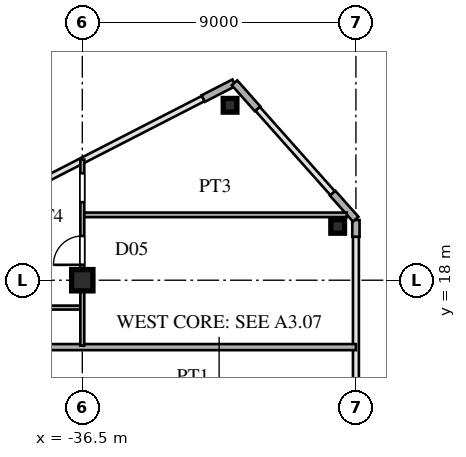
"""IFC4 building model, lengths in metres.
Left out: names, types, materials, properties, quantities, classifications, styles, units other than length and angle.
Written with IfcOpenShell. Run it as: python <this file> out.ifc"""

import sys

from ifc_helpers import new_model, si_unit, direction, frame, frame_2d, origin, origin_2d, place, context, subcontext, project, spatial, rectangle, hollow_rectangle, i_section, extrude, source, transform, mapped, element, fill, save


model = new_model("IFC4")
c1 = context("Model", 3, precision=1e-05, world=origin(), true_north=direction((0.0, 1.0)))
c2 = subcontext(c1, "Body", "Model", "MODEL_VIEW")
j1 = project(units=[si_unit("LENGTHUNIT", "METRE"), si_unit("PLANEANGLEUNIT", "RADIAN")], contexts=[c1])
p1 = place(None, origin())
s1 = spatial("IfcSite", under=j1, at=p1, CompositionType="ELEMENT")
p2 = place(p1, origin())
s2 = spatial("IfcBuilding", under=s1, at=p2, CompositionType="ELEMENT")
p3 = place(p2, frame((0.0, 0.0, 140.4)))
s3 = spatial("IfcBuildingStorey", under=s2, at=p3, CompositionType="ELEMENT", Elevation=140.4)
m1 = source(origin(), c2, "Body", "SweptSolid", [
    extrude(i_section(OverallWidth=0.7, OverallDepth=0.7, WebThickness=0.028, FlangeThickness=0.045, at=origin_2d()), origin(), (0.0, 0.0, 1.0), 3.6),
])
p4 = place(p3, frame((-36.5, 18.0, 0.0), z_axis=(0.0, 0.0, 1.0), x_axis=(1.0, 0.0, 0.0)))
e1 = element("IfcColumn", 1, at=p4, inside=s3, PredefinedType="COLUMN", context=c2, shape_type="MappedRepresentation", body=[
    mapped(m1, transform((0.0, 0.0, 0.0), scale=1.0)),
])
m2 = source(origin(), c2, "Body", "SweptSolid", [
    extrude(hollow_rectangle(XDim=0.45, YDim=0.45, WallThickness=0.018, at=origin_2d()), origin(), (0.0, 0.0, 1.0), 3.6),
])
for number, where, z_axis, x_axis in (
    (2, (-28.1, 19.772, 0.0), (0.0, 0.0, 1.0), (1.0, 0.0, 0.0)),
    (3, (-31.64, 23.754, 0.0), (0.0, 0.0, 1.0), (1.0, 0.0, 0.0)),
):
    element("IfcColumn", number, at=place(p3, frame(where, z_axis=z_axis, x_axis=x_axis)), inside=s3, PredefinedType="COLUMN", context=c2, shape_type="MappedRepresentation", body=[
        mapped(m2, transform((0.0, 0.0, 0.0), scale=1.0)),
    ])
p5 = place(p3, frame((-27.5, 19.43, 0.0), z_axis=(0.0, 0.0, 1.0), x_axis=(0.0, 1.0, 0.0)))
e4 = element("IfcWall", 4, at=p5, inside=s3, PredefinedType="SOLIDWALL", context=c2, shape_type="SweptSolid", body=[
    extrude(rectangle(XDim=0.55, YDim=0.24, at=frame_2d((0.275, 0.0))), origin(), (0.0, 0.0, 1.0), 3.38),
])
for number, where, z_axis, x_axis in (
    (5, (-27.507, 20.008, 0.0), (0.0, 0.0, 1.0), (-0.664, 0.747, 0.0)),
    (6, (-30.736, 23.64, 0.0), (0.0, 0.0, 1.0), (-0.664, 0.747, 0.0)),
):
    element("IfcWall", number, at=place(p3, frame(where, z_axis=z_axis, x_axis=x_axis)), inside=s3, PredefinedType="SOLIDWALL", context=c2, shape_type="SweptSolid", body=[
        extrude(rectangle(XDim=1.14, YDim=0.24, at=frame_2d((0.57, 0.0))), origin(), (0.0, 0.0, 1.0), 3.38),
    ])
p6 = place(p3, frame((-31.509, 24.495, 0.0), z_axis=(0.0, 0.0, 1.0), x_axis=(-0.889797395748, -0.456355776255, 0.0)))
e7 = element("IfcWall", 7, at=p6, inside=s3, PredefinedType="SOLIDWALL", context=c2, shape_type="SweptSolid", body=[
    extrude(rectangle(XDim=1.14, YDim=0.24, at=frame_2d((0.57, 0.0))), origin(), (0.0, 0.0, 1.0), 3.38),
])
p7 = place(p3, frame((-38.215, 15.8, 0.0), z_axis=(0.0, 0.0, 1.0), x_axis=(1.0, 0.0, 0.0)))
e8 = element("IfcWall", 8, at=p7, inside=s3, PredefinedType="PARTITIONING", context=c2, shape_type="SweptSolid", body=[
    extrude(rectangle(XDim=10.715, YDim=0.2, at=frame_2d((5.357, 0.0))), origin(), (0.0, 0.0, 1.0), 3.38),
])
p8 = place(p3, frame((-41.0, 17.1, 0.0), z_axis=(0.0, 0.0, 1.0), x_axis=(1.0, 0.0, 0.0)))
e9 = element("IfcWall", 9, at=p8, inside=s3, PredefinedType="PARTITIONING", context=c2, shape_type="SweptSolid", body=[
    extrude(rectangle(XDim=4.45, YDim=0.13, at=frame_2d((2.225, 0.0))), origin(), (0.0, 0.0, 1.0), 3.38),
])
p9 = place(p3, frame((-36.45, 20.15, 0.0), z_axis=(0.0, 0.0, 1.0), x_axis=(1.0, 0.0, 0.0)))
e10 = element("IfcWall", 10, at=p9, inside=s3, PredefinedType="PARTITIONING", context=c2, shape_type="SweptSolid", body=[
    extrude(rectangle(XDim=8.649, YDim=0.15, at=frame_2d((4.325, 0.0))), origin(), (0.0, 0.0, 1.0), 3.38),
])
p10 = place(p3, frame((-36.5, 15.85, 0.0), z_axis=(0.0, 0.0, 1.0), x_axis=(0.0, 1.0, 0.0)))
e11 = element("IfcWall", 11, at=p10, inside=s3, PredefinedType="PARTITIONING", context=c2, shape_type="SweptSolid", body=[
    extrude(rectangle(XDim=6.119, YDim=0.13, at=frame_2d((3.06, 0.0))), origin(), (0.0, 0.0, 1.0), 2.78),
])
p11 = place(p10, frame((2.656, 0.0, 0.0)))
e12 = element("IfcOpeningElement", 12, at=p11, cuts=e11, PredefinedType="OPENING", context=c2, shape_type="SweptSolid", body=[
    extrude(rectangle(XDim=0.95, YDim=2.15, at=frame_2d((0.475, 1.075))), frame((0.0, 0.075, 0.0), z_axis=(0.0, -1.0, 0.0), x_axis=(1.0, 0.0, 0.0)), (0.0, 0.0, 1.0), 0.15),
])
p12 = place(p10, frame((4.717, 0.0, 0.0)))
e13 = element("IfcOpeningElement", 13, at=p12, cuts=e11, PredefinedType="OPENING", context=c2, shape_type="SweptSolid", body=[
    extrude(rectangle(XDim=0.95, YDim=2.15, at=frame_2d((0.475, 1.075))), frame((0.0, 0.075, 0.0), z_axis=(0.0, -1.0, 0.0), x_axis=(1.0, 0.0, 0.0)), (0.0, 0.0, 1.0), 0.15),
])
m3 = source(origin(), c2, "Body", "SweptSolid", [
    extrude(rectangle(XDim=0.95, YDim=2.15, at=frame_2d((0.475, 1.075))), frame((0.0, 0.025, 0.0), z_axis=(0.0, -1.0, 0.0), x_axis=(1.0, 0.0, 0.0)), (0.0, 0.0, 1.0), 0.05),
])
p13 = place(p11, origin())
e14 = element("IfcDoor", 14, at=p13, inside=s3, OperationType="SINGLE_SWING_LEFT", PredefinedType="DOOR", context=c2, shape_type="MappedRepresentation", body=[
    mapped(m3, transform((0.0, 0.0, 0.0), scale=1.0)),
])
fill(e12, e14)
save(model, sys.argv[1])
